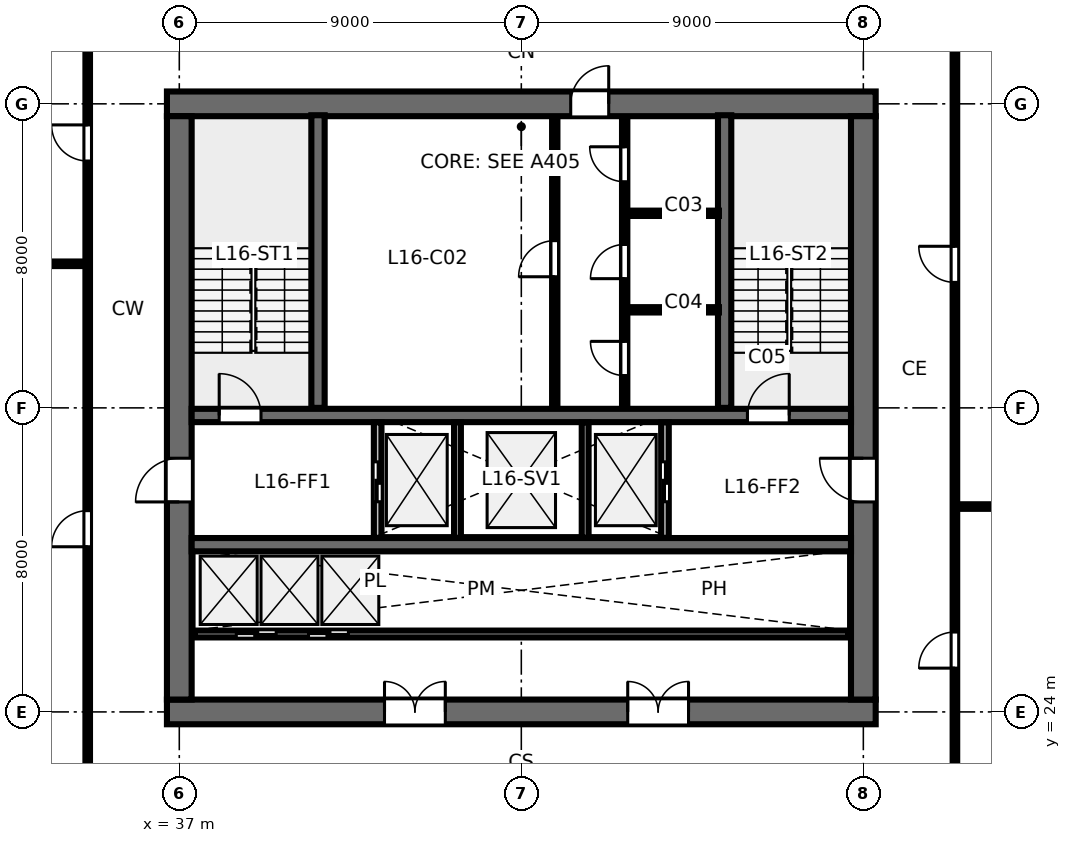
"""IFC4 building model, lengths in metres.
Left out: names, types, materials, properties, quantities, classifications, styles, units other than length and angle.
Written with IfcOpenShell. Run it as: python <this file> out.ifc"""

import sys

from ifc_helpers import new_model, si_unit, direction, frame, frame_2d, origin, place, context, subcontext, project, spatial, rectangle, extrude, element, fill, save


model = new_model("IFC4")
c1 = context("Model", 3, precision=1e-05, world=origin(), true_north=direction((0.0, 1.0)))
c2 = subcontext(c1, "Body", "Model", "MODEL_VIEW")
j1 = project(units=[si_unit("LENGTHUNIT", "METRE"), si_unit("PLANEANGLEUNIT", "RADIAN")], contexts=[c1])
p1 = place(None, origin())
s1 = spatial("IfcSite", under=j1, at=p1, CompositionType="ELEMENT")
p2 = place(p1, origin())
s2 = spatial("IfcBuilding", under=s1, at=p2, CompositionType="ELEMENT")
p3 = place(p2, frame((0.0, 0.0, 64.0)))
s3 = spatial("IfcBuildingStorey", under=s2, at=p3, CompositionType="ELEMENT", Elevation=64.0)
p4 = place(p3, frame((36.675, 24.0, 0.0), z_axis=(0.0, 0.0, 1.0), x_axis=(1.0, 0.0, 0.0)))
e1 = element("IfcWall", 1, at=p4, inside=s3, PredefinedType="SHEAR", context=c2, shape_type="SweptSolid", body=[
    extrude(rectangle(XDim=18.65, YDim=0.65, at=frame_2d((9.325, 0.0))), origin(), (0.0, 0.0, 1.0), 3.36),
])
p5 = place(p4, frame((5.725, 0.0, 0.0)))
e2 = element("IfcOpeningElement", 2, at=p5, cuts=e1, PredefinedType="OPENING", context=c2, shape_type="SweptSolid", body=[
    extrude(rectangle(XDim=1.6, YDim=2.15, at=frame_2d((0.8, 1.075))), frame((0.0, 0.335, 0.0), z_axis=(0.0, -1.0, 0.0), x_axis=(1.0, 0.0, 0.0)), (0.0, 0.0, 1.0), 0.67),
])
p6 = place(p4, frame((12.125, 0.0, 0.0)))
e3 = element("IfcOpeningElement", 3, at=p6, cuts=e1, PredefinedType="OPENING", context=c2, shape_type="SweptSolid", body=[
    extrude(rectangle(XDim=1.6, YDim=2.15, at=frame_2d((0.8, 1.075))), frame((0.0, 0.335, 0.0), z_axis=(0.0, -1.0, 0.0), x_axis=(1.0, 0.0, 0.0)), (0.0, 0.0, 1.0), 0.67),
])
p7 = place(p3, frame((36.675, 40.0, 0.0), z_axis=(0.0, 0.0, 1.0), x_axis=(1.0, 0.0, 0.0)))
e4 = element("IfcWall", 4, at=p7, inside=s3, PredefinedType="SHEAR", context=c2, shape_type="SweptSolid", body=[
    extrude(rectangle(XDim=18.65, YDim=0.65, at=frame_2d((9.325, 0.0))), origin(), (0.0, 0.0, 1.0), 3.36),
])
p8 = place(p7, frame((10.625, 0.0, 0.0)))
e5 = element("IfcOpeningElement", 5, at=p8, cuts=e4, PredefinedType="OPENING", context=c2, shape_type="SweptSolid", body=[
    extrude(rectangle(XDim=1.0, YDim=2.15, at=frame_2d((0.5, 1.075))), frame((0.0, 0.335, 0.0), z_axis=(0.0, -1.0, 0.0), x_axis=(1.0, 0.0, 0.0)), (0.0, 0.0, 1.0), 0.67),
])
p9 = place(p3, frame((37.0, 24.325, 0.0), z_axis=(0.0, 0.0, 1.0), x_axis=(0.0, 1.0, 0.0)))
e6 = element("IfcWall", 6, at=p9, inside=s3, PredefinedType="SHEAR", context=c2, shape_type="SweptSolid", body=[
    extrude(rectangle(XDim=15.35, YDim=0.65, at=frame_2d((7.675, 0.0))), origin(), (0.0, 0.0, 1.0), 3.36),
])
p10 = place(p9, frame((5.2, 0.0, 0.0)))
e7 = element("IfcOpeningElement", 7, at=p10, cuts=e6, PredefinedType="OPENING", context=c2, shape_type="SweptSolid", body=[
    extrude(rectangle(XDim=1.15, YDim=2.15, at=frame_2d((0.575, 1.075))), frame((0.0, 0.335, 0.0), z_axis=(0.0, -1.0, 0.0), x_axis=(1.0, 0.0, 0.0)), (0.0, 0.0, 1.0), 0.67),
])
p11 = place(p3, frame((55.0, 24.325, 0.0), z_axis=(0.0, 0.0, 1.0), x_axis=(0.0, 1.0, 0.0)))
e8 = element("IfcWall", 8, at=p11, inside=s3, PredefinedType="SHEAR", context=c2, shape_type="SweptSolid", body=[
    extrude(rectangle(XDim=15.35, YDim=0.65, at=frame_2d((7.675, 0.0))), origin(), (0.0, 0.0, 1.0), 3.36),
])
p12 = place(p11, frame((5.2, 0.0, 0.0)))
e9 = element("IfcOpeningElement", 9, at=p12, cuts=e8, PredefinedType="OPENING", context=c2, shape_type="SweptSolid", body=[
    extrude(rectangle(XDim=1.15, YDim=2.15, at=frame_2d((0.575, 1.075))), frame((0.0, 0.335, 0.0), z_axis=(0.0, -1.0, 0.0), x_axis=(1.0, 0.0, 0.0)), (0.0, 0.0, 1.0), 0.67),
])
p13 = place(p3, frame((37.325, 31.8, 0.0), z_axis=(0.0, 0.0, 1.0), x_axis=(1.0, 0.0, 0.0)))
e10 = element("IfcWall", 10, at=p13, inside=s3, PredefinedType="SHEAR", context=c2, shape_type="SweptSolid", body=[
    extrude(rectangle(XDim=17.35, YDim=0.35, at=frame_2d((8.675, 0.0))), origin(), (0.0, 0.0, 1.0), 3.36),
])
p14 = place(p13, frame((0.725, 0.0, 0.0)))
e11 = element("IfcOpeningElement", 11, at=p14, cuts=e10, PredefinedType="OPENING", context=c2, shape_type="SweptSolid", body=[
    extrude(rectangle(XDim=1.1, YDim=2.15, at=frame_2d((0.55, 1.075))), frame((0.0, 0.185, 0.0), z_axis=(0.0, -1.0, 0.0), x_axis=(1.0, 0.0, 0.0)), (0.0, 0.0, 1.0), 0.37),
])
p15 = place(p13, frame((14.625, 0.0, 0.0)))
e12 = element("IfcOpeningElement", 12, at=p15, cuts=e10, PredefinedType="OPENING", context=c2, shape_type="SweptSolid", body=[
    extrude(rectangle(XDim=1.1, YDim=2.15, at=frame_2d((0.55, 1.075))), frame((0.0, 0.185, 0.0), z_axis=(0.0, -1.0, 0.0), x_axis=(1.0, 0.0, 0.0)), (0.0, 0.0, 1.0), 0.37),
])
p16 = place(p3, frame((37.325, 28.4, 0.0), z_axis=(0.0, 0.0, 1.0), x_axis=(1.0, 0.0, 0.0)))
e13 = element("IfcWall", 13, at=p16, inside=s3, PredefinedType="SHEAR", context=c2, shape_type="SweptSolid", body=[
    extrude(rectangle(XDim=17.35, YDim=0.35, at=frame_2d((8.675, 0.0))), origin(), (0.0, 0.0, 1.0), 3.36),
])
for number, where, z_axis, x_axis in (
    (14, (40.65, 32.0, 0.0), (0.0, 0.0, 1.0), (0.0, 1.0, 0.0)),
    (15, (51.35, 32.0, 0.0), (0.0, 0.0, 1.0), (0.0, 1.0, 0.0)),
):
    element("IfcWall", number, at=place(p3, frame(where, z_axis=z_axis, x_axis=x_axis)), inside=s3, PredefinedType="SHEAR", context=c2, shape_type="SweptSolid", body=[
        extrude(rectangle(XDim=7.7, YDim=0.35, at=frame_2d((3.85, 0.0))), origin(), (0.0, 0.0, 1.0), 3.6),
    ])
p17 = place(p3, frame((46.88, 32.05, 0.0), z_axis=(0.0, 0.0, 1.0), x_axis=(0.0, 1.0, 0.0)))
e16 = element("IfcWall", 16, at=p17, inside=s3, PredefinedType="PARTITIONING", context=c2, shape_type="SweptSolid", body=[
    extrude(rectangle(XDim=7.6, YDim=0.14, at=frame_2d((3.8, 0.0))), origin(), (0.0, 0.0, 1.0), 3.36),
])
p18 = place(p17, frame((3.4, 0.0, 0.0)))
e17 = element("IfcOpeningElement", 17, at=p18, cuts=e16, PredefinedType="OPENING", context=c2, shape_type="SweptSolid", body=[
    extrude(rectangle(XDim=0.95, YDim=2.15, at=frame_2d((0.475, 1.075))), frame((0.0, 0.08, 0.0), z_axis=(0.0, -1.0, 0.0), x_axis=(1.0, 0.0, 0.0)), (0.0, 0.0, 1.0), 0.16),
])
p19 = place(p3, frame((48.72, 32.05, 0.0), z_axis=(0.0, 0.0, 1.0), x_axis=(0.0, 1.0, 0.0)))
e18 = element("IfcWall", 18, at=p19, inside=s3, PredefinedType="PARTITIONING", context=c2, shape_type="SweptSolid", body=[
    extrude(rectangle(XDim=7.6, YDim=0.14, at=frame_2d((3.8, 0.0))), origin(), (0.0, 0.0, 1.0), 3.36),
])
p20 = place(p19, frame((0.8, 0.0, 0.0)))
e19 = element("IfcOpeningElement", 19, at=p20, cuts=e18, PredefinedType="OPENING", context=c2, shape_type="SweptSolid", body=[
    extrude(rectangle(XDim=0.9, YDim=2.15, at=frame_2d((0.45, 1.075))), frame((0.0, 0.08, 0.0), z_axis=(0.0, -1.0, 0.0), x_axis=(1.0, 0.0, 0.0)), (0.0, 0.0, 1.0), 0.16),
])
p21 = place(p19, frame((3.35, 0.0, 0.0)))
e20 = element("IfcOpeningElement", 20, at=p21, cuts=e18, PredefinedType="OPENING", context=c2, shape_type="SweptSolid", body=[
    extrude(rectangle(XDim=0.9, YDim=2.15, at=frame_2d((0.45, 1.075))), frame((0.0, 0.08, 0.0), z_axis=(0.0, -1.0, 0.0), x_axis=(1.0, 0.0, 0.0)), (0.0, 0.0, 1.0), 0.16),
])
p22 = place(p19, frame((5.9, 0.0, 0.0)))
e21 = element("IfcOpeningElement", 21, at=p22, cuts=e18, PredefinedType="OPENING", context=c2, shape_type="SweptSolid", body=[
    extrude(rectangle(XDim=0.92, YDim=2.15, at=frame_2d((0.46, 1.075))), frame((0.0, 0.08, 0.0), z_axis=(0.0, -1.0, 0.0), x_axis=(1.0, 0.0, 0.0)), (0.0, 0.0, 1.0), 0.16),
])
for number, where, z_axis, x_axis in (
    (22, (48.8, 34.58, 0.0), (0.0, 0.0, 1.0), (1.0, 0.0, 0.0)),
    (23, (48.8, 37.12, 0.0), (0.0, 0.0, 1.0), (1.0, 0.0, 0.0)),
):
    element("IfcWall", number, at=place(p3, frame(where, z_axis=z_axis, x_axis=x_axis)), inside=s3, PredefinedType="PARTITIONING", context=c2, shape_type="SweptSolid", body=[
        extrude(rectangle(XDim=2.4, YDim=0.14, at=frame_2d((1.2, 0.0))), origin(), (0.0, 0.0, 1.0), 3.36),
    ])
p23 = place(p3, frame((42.22, 28.58, 0.0), z_axis=(0.0, 0.0, 1.0), x_axis=(0.0, 1.0, 0.0)))
e24 = element("IfcWall", 24, at=p23, inside=s3, PredefinedType="PARTITIONING", context=c2, shape_type="SweptSolid", body=[
    extrude(rectangle(XDim=3.04, YDim=0.2, at=frame_2d((1.52, 0.0))), origin(), (0.0, 0.0, 1.0), 3.36),
])
p24 = place(p23, frame((0.95, 0.0, 0.0)))
e25 = element("IfcOpeningElement", 25, at=p24, cuts=e24, PredefinedType="OPENING", context=c2, shape_type="SweptSolid", body=[
    extrude(rectangle(XDim=1.05, YDim=2.15, at=frame_2d((0.525, 1.075))), frame((0.0, 0.11, 0.0), z_axis=(0.0, -1.0, 0.0), x_axis=(1.0, 0.0, 0.0)), (0.0, 0.0, 1.0), 0.22),
])
p25 = place(p3, frame((49.78, 28.58, 0.0), z_axis=(0.0, 0.0, 1.0), x_axis=(0.0, 1.0, 0.0)))
e26 = element("IfcWall", 26, at=p25, inside=s3, PredefinedType="PARTITIONING", context=c2, shape_type="SweptSolid", body=[
    extrude(rectangle(XDim=3.04, YDim=0.2, at=frame_2d((1.52, 0.0))), origin(), (0.0, 0.0, 1.0), 3.36),
])
p26 = place(p25, frame((0.95, 0.0, 0.0)))
e27 = element("IfcOpeningElement", 27, at=p26, cuts=e26, PredefinedType="OPENING", context=c2, shape_type="SweptSolid", body=[
    extrude(rectangle(XDim=1.05, YDim=2.15, at=frame_2d((0.525, 1.075))), frame((0.0, 0.11, 0.0), z_axis=(0.0, -1.0, 0.0), x_axis=(1.0, 0.0, 0.0)), (0.0, 0.0, 1.0), 0.22),
])
for number, where, z_axis, x_axis in (
    (28, (44.32, 28.58, 0.0), (0.0, 0.0, 1.0), (0.0, 1.0, 0.0)),
    (29, (47.68, 28.58, 0.0), (0.0, 0.0, 1.0), (0.0, 1.0, 0.0)),
):
    element("IfcWall", number, at=place(p3, frame(where, z_axis=z_axis, x_axis=x_axis)), inside=s3, PredefinedType="PARTITIONING", context=c2, shape_type="SweptSolid", body=[
        extrude(rectangle(XDim=3.04, YDim=0.18, at=frame_2d((1.52, 0.0))), origin(), (0.0, 0.0, 1.0), 3.36),
    ])
p27 = place(p3, frame((37.4, 26.05, 0.0), z_axis=(0.0, 0.0, 1.0), x_axis=(1.0, 0.0, 0.0)))
e30 = element("IfcWall", 30, at=p27, inside=s3, PredefinedType="PARTITIONING", context=c2, shape_type="SweptSolid", body=[
    extrude(rectangle(XDim=17.2, YDim=0.18, at=frame_2d((8.6, 0.0))), origin(), (0.0, 0.0, 1.0), 3.36),
])
p28 = place(p27, frame((1.1, 0.0, 0.0)))
e31 = element("IfcOpeningElement", 31, at=p28, cuts=e30, PredefinedType="OPENING", context=c2, shape_type="SweptSolid", body=[
    extrude(rectangle(XDim=1.05, YDim=2.15, at=frame_2d((0.525, 1.075))), frame((0.0, 0.1, 0.0), z_axis=(0.0, -1.0, 0.0), x_axis=(1.0, 0.0, 0.0)), (0.0, 0.0, 1.0), 0.2),
])
p29 = place(p27, frame((3.0, 0.0, 0.0)))
e32 = element("IfcOpeningElement", 32, at=p29, cuts=e30, PredefinedType="OPENING", context=c2, shape_type="SweptSolid", body=[
    extrude(rectangle(XDim=1.05, YDim=2.15, at=frame_2d((0.525, 1.075))), frame((0.0, 0.1, 0.0), z_axis=(0.0, -1.0, 0.0), x_axis=(1.0, 0.0, 0.0)), (0.0, 0.0, 1.0), 0.2),
])
p30 = place(p3, frame((34.59, 35.791, 0.0), z_axis=(0.0, 0.0, 1.0), x_axis=(-1.0, 0.0, 0.0)))
e33 = element("IfcWall", 33, at=p30, inside=s3, PredefinedType="PARTITIONING", context=c2, shape_type="SweptSolid", body=[
    extrude(rectangle(XDim=13.06, YDim=0.12, at=frame_2d((6.53, 0.0))), origin(), (0.0, 0.0, 1.0), 2.64),
])
p31 = place(p30, frame((1.4, 0.0, 0.0)))
e34 = element("IfcOpeningElement", 34, at=p31, cuts=e33, PredefinedType="OPENING", context=c2, shape_type="SweptSolid", body=[
    extrude(rectangle(XDim=0.9, YDim=2.15, at=frame_2d((0.45, 1.075))), frame((0.0, 0.07, 0.0), z_axis=(0.0, -1.0, 0.0), x_axis=(1.0, 0.0, 0.0)), (0.0, 0.0, 1.0), 0.14),
])
p32 = place(p3, frame((34.59, 21.65, 0.0), z_axis=(0.0, 0.0, 1.0), x_axis=(0.0, 1.0, 0.0)))
e35 = element("IfcWall", 35, at=p32, inside=s3, PredefinedType="PARTITIONING", context=c2, shape_type="SweptSolid", body=[
    extrude(rectangle(XDim=20.7, YDim=0.12, at=frame_2d((10.35, 0.0))), origin(), (0.0, 0.0, 1.0), 2.64),
])
p33 = place(p32, frame((6.696, 0.0, 0.0)))
e36 = element("IfcOpeningElement", 36, at=p33, cuts=e35, PredefinedType="OPENING", context=c2, shape_type="SweptSolid", body=[
    extrude(rectangle(XDim=0.95, YDim=2.15, at=frame_2d((0.475, 1.075))), frame((0.0, 0.07, 0.0), z_axis=(0.0, -1.0, 0.0), x_axis=(1.0, 0.0, 0.0)), (0.0, 0.0, 1.0), 0.14),
])
p34 = place(p32, frame((16.846, 0.0, 0.0)))
e37 = element("IfcOpeningElement", 37, at=p34, cuts=e35, PredefinedType="OPENING", context=c2, shape_type="SweptSolid", body=[
    extrude(rectangle(XDim=0.95, YDim=2.15, at=frame_2d((0.475, 1.075))), frame((0.0, 0.07, 0.0), z_axis=(0.0, -1.0, 0.0), x_axis=(1.0, 0.0, 0.0)), (0.0, 0.0, 1.0), 0.14),
])
p35 = place(p3, frame((57.41, 29.404, 0.0), z_axis=(0.0, 0.0, 1.0), x_axis=(1.0, 0.0, 0.0)))
e38 = element("IfcWall", 38, at=p35, inside=s3, PredefinedType="PARTITIONING", context=c2, shape_type="SweptSolid", body=[
    extrude(rectangle(XDim=13.06, YDim=0.12, at=frame_2d((6.53, 0.0))), origin(), (0.0, 0.0, 1.0), 2.64),
])
p36 = place(p35, frame((1.4, 0.0, 0.0)))
e39 = element("IfcOpeningElement", 39, at=p36, cuts=e38, PredefinedType="OPENING", context=c2, shape_type="SweptSolid", body=[
    extrude(rectangle(XDim=0.9, YDim=2.15, at=frame_2d((0.45, 1.075))), frame((0.0, 0.07, 0.0), z_axis=(0.0, -1.0, 0.0), x_axis=(1.0, 0.0, 0.0)), (0.0, 0.0, 1.0), 0.14),
])
p37 = place(p3, frame((57.41, 21.65, 0.0), z_axis=(0.0, 0.0, 1.0), x_axis=(0.0, 1.0, 0.0)))
e40 = element("IfcWall", 40, at=p37, inside=s3, PredefinedType="PARTITIONING", context=c2, shape_type="SweptSolid", body=[
    extrude(rectangle(XDim=20.7, YDim=0.12, at=frame_2d((10.35, 0.0))), origin(), (0.0, 0.0, 1.0), 2.64),
])
p38 = place(p37, frame((3.502, 0.0, 0.0)))
e41 = element("IfcOpeningElement", 41, at=p38, cuts=e40, PredefinedType="OPENING", context=c2, shape_type="SweptSolid", body=[
    extrude(rectangle(XDim=0.95, YDim=2.15, at=frame_2d((0.475, 1.075))), frame((0.0, 0.07, 0.0), z_axis=(0.0, -1.0, 0.0), x_axis=(1.0, 0.0, 0.0)), (0.0, 0.0, 1.0), 0.14),
])
p39 = place(p37, frame((13.652, 0.0, 0.0)))
e42 = element("IfcOpeningElement", 42, at=p39, cuts=e40, PredefinedType="OPENING", context=c2, shape_type="SweptSolid", body=[
    extrude(rectangle(XDim=0.95, YDim=2.15, at=frame_2d((0.475, 1.075))), frame((0.0, 0.07, 0.0), z_axis=(0.0, -1.0, 0.0), x_axis=(1.0, 0.0, 0.0)), (0.0, 0.0, 1.0), 0.14),
])
p40 = place(p14, origin())
e43 = element("IfcDoor", 43, at=p40, inside=s3, OperationType="SINGLE_SWING_LEFT", PredefinedType="DOOR", context=c2, shape_type="SweptSolid", body=[
    extrude(rectangle(XDim=1.1, YDim=2.15, at=frame_2d((0.55, 1.075))), frame((0.0, 0.025, 0.0), z_axis=(0.0, -1.0, 0.0), x_axis=(1.0, 0.0, 0.0)), (0.0, 0.0, 1.0), 0.05),
])
fill(e11, e43)
p41 = place(p15, origin())
e44 = element("IfcDoor", 44, at=p41, inside=s3, OperationType="SINGLE_SWING_RIGHT", PredefinedType="DOOR", context=c2, shape_type="SweptSolid", body=[
    extrude(rectangle(XDim=1.1, YDim=2.15, at=frame_2d((0.55, 1.075))), frame((0.0, 0.025, 0.0), z_axis=(0.0, -1.0, 0.0), x_axis=(1.0, 0.0, 0.0)), (0.0, 0.0, 1.0), 0.05),
])
fill(e12, e44)
p42 = place(p8, origin())
e45 = element("IfcDoor", 45, at=p42, inside=s3, OperationType="SINGLE_SWING_RIGHT", PredefinedType="DOOR", context=c2, shape_type="SweptSolid", body=[
    extrude(rectangle(XDim=1.0, YDim=2.15, at=frame_2d((0.5, 1.075))), frame((0.0, 0.025, 0.0), z_axis=(0.0, -1.0, 0.0), x_axis=(1.0, 0.0, 0.0)), (0.0, 0.0, 1.0), 0.05),
])
fill(e5, e45)
p43 = place(p10, origin())
e46 = element("IfcDoor", 46, at=p43, inside=s3, OperationType="SINGLE_SWING_LEFT", PredefinedType="DOOR", context=c2, shape_type="SweptSolid", body=[
    extrude(rectangle(XDim=1.15, YDim=2.15, at=frame_2d((0.575, 1.075))), frame((0.0, 0.025, 0.0), z_axis=(0.0, -1.0, 0.0), x_axis=(1.0, 0.0, 0.0)), (0.0, 0.0, 1.0), 0.05),
])
fill(e7, e46)
p44 = place(p12, origin())
e47 = element("IfcDoor", 47, at=p44, inside=s3, OperationType="SINGLE_SWING_RIGHT", PredefinedType="DOOR", context=c2, shape_type="SweptSolid", body=[
    extrude(rectangle(XDim=1.15, YDim=2.15, at=frame_2d((0.575, 1.075))), frame((0.0, 0.025, 0.0), z_axis=(0.0, -1.0, 0.0), x_axis=(1.0, 0.0, 0.0)), (0.0, 0.0, 1.0), 0.05),
])
fill(e9, e47)
p45 = place(p5, origin())
e48 = element("IfcDoor", 48, at=p45, inside=s3, OperationType="DOUBLE_DOOR_SINGLE_SWING", PredefinedType="DOOR", context=c2, shape_type="SweptSolid", body=[
    extrude(rectangle(XDim=1.6, YDim=2.15, at=frame_2d((0.8, 1.075))), frame((0.0, 0.025, 0.0), z_axis=(0.0, -1.0, 0.0), x_axis=(1.0, 0.0, 0.0)), (0.0, 0.0, 1.0), 0.05),
])
fill(e2, e48)
p46 = place(p6, origin())
e49 = element("IfcDoor", 49, at=p46, inside=s3, OperationType="DOUBLE_DOOR_SINGLE_SWING", PredefinedType="DOOR", context=c2, shape_type="SweptSolid", body=[
    extrude(rectangle(XDim=1.6, YDim=2.15, at=frame_2d((0.8, 1.075))), frame((0.0, 0.025, 0.0), z_axis=(0.0, -1.0, 0.0), x_axis=(1.0, 0.0, 0.0)), (0.0, 0.0, 1.0), 0.05),
])
fill(e3, e49)
p47 = place(p18, origin())
e50 = element("IfcDoor", 50, at=p47, inside=s3, OperationType="SINGLE_SWING_LEFT", PredefinedType="DOOR", context=c2, shape_type="SweptSolid", body=[
    extrude(rectangle(XDim=0.95, YDim=2.15, at=frame_2d((0.475, 1.075))), frame((0.0, 0.025, 0.0), z_axis=(0.0, -1.0, 0.0), x_axis=(1.0, 0.0, 0.0)), (0.0, 0.0, 1.0), 0.05),
])
fill(e17, e50)
p48 = place(p20, origin())
e51 = element("IfcDoor", 51, at=p48, inside=s3, OperationType="SINGLE_SWING_RIGHT", PredefinedType="DOOR", context=c2, shape_type="SweptSolid", body=[
    extrude(rectangle(XDim=0.9, YDim=2.15, at=frame_2d((0.45, 1.075))), frame((0.0, 0.025, 0.0), z_axis=(0.0, -1.0, 0.0), x_axis=(1.0, 0.0, 0.0)), (0.0, 0.0, 1.0), 0.05),
])
fill(e19, e51)
p49 = place(p21, origin())
e52 = element("IfcDoor", 52, at=p49, inside=s3, OperationType="SINGLE_SWING_LEFT", PredefinedType="DOOR", context=c2, shape_type="SweptSolid", body=[
    extrude(rectangle(XDim=0.9, YDim=2.15, at=frame_2d((0.45, 1.075))), frame((0.0, 0.025, 0.0), z_axis=(0.0, -1.0, 0.0), x_axis=(1.0, 0.0, 0.0)), (0.0, 0.0, 1.0), 0.05),
])
fill(e20, e52)
p50 = place(p22, origin())
e53 = element("IfcDoor", 53, at=p50, inside=s3, OperationType="SINGLE_SWING_RIGHT", PredefinedType="DOOR", context=c2, shape_type="SweptSolid", body=[
    extrude(rectangle(XDim=0.92, YDim=2.15, at=frame_2d((0.46, 1.075))), frame((0.0, 0.025, 0.0), z_axis=(0.0, -1.0, 0.0), x_axis=(1.0, 0.0, 0.0)), (0.0, 0.0, 1.0), 0.05),
])
fill(e21, e53)
p51 = place(p24, origin())
e54 = element("IfcDoor", 54, at=p51, inside=s3, OperationType="SLIDING_TO_LEFT", PredefinedType="DOOR", context=c2, shape_type="SweptSolid", body=[
    extrude(rectangle(XDim=1.05, YDim=2.15, at=frame_2d((0.525, 1.075))), frame((0.0, 0.025, 0.0), z_axis=(0.0, -1.0, 0.0), x_axis=(1.0, 0.0, 0.0)), (0.0, 0.0, 1.0), 0.05),
])
fill(e25, e54)
p52 = place(p26, origin())
e55 = element("IfcDoor", 55, at=p52, inside=s3, OperationType="SLIDING_TO_RIGHT", PredefinedType="DOOR", context=c2, shape_type="SweptSolid", body=[
    extrude(rectangle(XDim=1.05, YDim=2.15, at=frame_2d((0.525, 1.075))), frame((0.0, 0.025, 0.0), z_axis=(0.0, -1.0, 0.0), x_axis=(1.0, 0.0, 0.0)), (0.0, 0.0, 1.0), 0.05),
])
fill(e27, e55)
p53 = place(p28, origin())
e56 = element("IfcDoor", 56, at=p53, inside=s3, OperationType="SLIDING_TO_LEFT", PredefinedType="DOOR", context=c2, shape_type="SweptSolid", body=[
    extrude(rectangle(XDim=1.05, YDim=2.15, at=frame_2d((0.525, 1.075))), frame((0.0, 0.025, 0.0), z_axis=(0.0, -1.0, 0.0), x_axis=(1.0, 0.0, 0.0)), (0.0, 0.0, 1.0), 0.05),
])
fill(e31, e56)
p54 = place(p29, origin())
e57 = element("IfcDoor", 57, at=p54, inside=s3, OperationType="SLIDING_TO_RIGHT", PredefinedType="DOOR", context=c2, shape_type="SweptSolid", body=[
    extrude(rectangle(XDim=1.05, YDim=2.15, at=frame_2d((0.525, 1.075))), frame((0.0, 0.025, 0.0), z_axis=(0.0, -1.0, 0.0), x_axis=(1.0, 0.0, 0.0)), (0.0, 0.0, 1.0), 0.05),
])
fill(e32, e57)
p55 = place(p33, origin())
e58 = element("IfcDoor", 58, at=p55, inside=s3, OperationType="SINGLE_SWING_LEFT", PredefinedType="DOOR", context=c2, shape_type="SweptSolid", body=[
    extrude(rectangle(XDim=0.95, YDim=2.15, at=frame_2d((0.475, 1.075))), frame((0.0, 0.025, 0.0), z_axis=(0.0, -1.0, 0.0), x_axis=(1.0, 0.0, 0.0)), (0.0, 0.0, 1.0), 0.05),
])
fill(e36, e58)
p56 = place(p34, origin())
e59 = element("IfcDoor", 59, at=p56, inside=s3, OperationType="SINGLE_SWING_RIGHT", PredefinedType="DOOR", context=c2, shape_type="SweptSolid", body=[
    extrude(rectangle(XDim=0.95, YDim=2.15, at=frame_2d((0.475, 1.075))), frame((0.0, 0.025, 0.0), z_axis=(0.0, -1.0, 0.0), x_axis=(1.0, 0.0, 0.0)), (0.0, 0.0, 1.0), 0.05),
])
fill(e37, e59)
p57 = place(p38, origin())
e60 = element("IfcDoor", 60, at=p57, inside=s3, OperationType="SINGLE_SWING_LEFT", PredefinedType="DOOR", context=c2, shape_type="SweptSolid", body=[
    extrude(rectangle(XDim=0.95, YDim=2.15, at=frame_2d((0.475, 1.075))), frame((0.0, 0.025, 0.0), z_axis=(0.0, -1.0, 0.0), x_axis=(1.0, 0.0, 0.0)), (0.0, 0.0, 1.0), 0.05),
])
fill(e41, e60)
p58 = place(p39, origin())
e61 = element("IfcDoor", 61, at=p58, inside=s3, OperationType="SINGLE_SWING_RIGHT", PredefinedType="DOOR", context=c2, shape_type="SweptSolid", body=[
    extrude(rectangle(XDim=0.95, YDim=2.15, at=frame_2d((0.475, 1.075))), frame((0.0, 0.025, 0.0), z_axis=(0.0, -1.0, 0.0), x_axis=(1.0, 0.0, 0.0)), (0.0, 0.0, 1.0), 0.05),
])
fill(e42, e61)
save(model, sys.argv[1])
